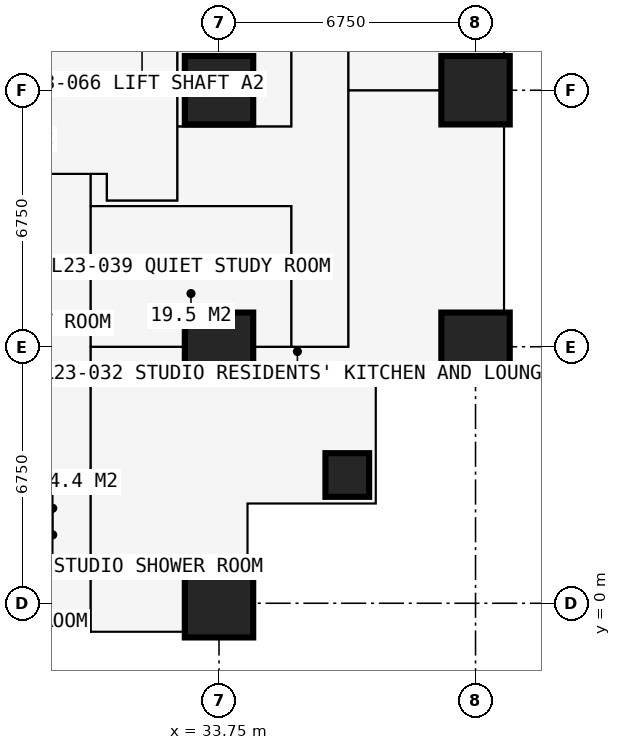
"""IFC4 building model, lengths in metres.
Left out: names, types, materials, properties, quantities, classifications, styles, units other than length and angle.
Written with IfcOpenShell. Run it as: python <this file> out.ifc"""

import sys

from ifc_helpers import new_model, si_unit, direction, frame, frame_2d, origin, origin_2d, place, context, subcontext, project, spatial, rectangle, extrude, element, fill, save


model = new_model("IFC4")
c1 = context("Model", 3, precision=1e-05, world=origin(), true_north=direction((0.0, 1.0)))
c2 = subcontext(c1, "Body", "Model", "MODEL_VIEW")
j1 = project(units=[si_unit("LENGTHUNIT", "METRE"), si_unit("PLANEANGLEUNIT", "RADIAN")], contexts=[c1])
p1 = place(None, origin())
s1 = spatial("IfcSite", under=j1, at=p1, CompositionType="ELEMENT")
p2 = place(p1, origin())
s2 = spatial("IfcBuilding", under=s1, at=p2, CompositionType="ELEMENT")
p3 = place(p2, frame((0.0, 0.0, 87.3)))
s3 = spatial("IfcBuildingStorey", under=s2, at=p3, CompositionType="ELEMENT", Elevation=87.3)
for number, where, z_axis, x_axis in (
    (1, (33.75, 0.0, 0.0), (0.0, 0.0, 1.0), (1.0, 0.0, 0.0)),
    (2, (33.75, 6.75, 0.0), (0.0, 0.0, 1.0), (1.0, 0.0, 0.0)),
    (3, (33.75, 13.5, 0.0), (0.0, 0.0, 1.0), (1.0, 0.0, 0.0)),
):
    element("IfcColumn", number, at=place(p3, frame(where, z_axis=z_axis, x_axis=x_axis)), inside=s3, PredefinedType="COLUMN", context=c2, shape_type="SweptSolid", body=[
        extrude(rectangle(XDim=1.8, YDim=1.8, at=origin_2d()), origin(), (0.0, 0.0, 1.0), 3.6),
    ])
p4 = place(p3, frame((37.125, 3.375, 0.0), z_axis=(0.0, 0.0, 1.0), x_axis=(1.0, 0.0, 0.0)))
e4 = element("IfcColumn", 4, at=p4, inside=s3, PredefinedType="COLUMN", context=c2, shape_type="SweptSolid", body=[
    extrude(rectangle(XDim=1.15, YDim=1.15, at=origin_2d()), origin(), (0.0, 0.0, 1.0), 3.6),
])
for number, where, z_axis, x_axis in (
    (5, (40.5, 6.75, 0.0), (0.0, 0.0, 1.0), (1.0, 0.0, 0.0)),
    (6, (40.5, 13.5, 0.0), (0.0, 0.0, 1.0), (1.0, 0.0, 0.0)),
):
    element("IfcColumn", number, at=place(p3, frame(where, z_axis=z_axis, x_axis=x_axis)), inside=s3, PredefinedType="COLUMN", context=c2, shape_type="SweptSolid", body=[
        extrude(rectangle(XDim=1.8, YDim=1.8, at=origin_2d()), origin(), (0.0, 0.0, 1.0), 3.6),
    ])
p5 = place(p3, frame((41.25, 20.25, 0.0), z_axis=(0.0, 0.0, 1.0), x_axis=(0.0, -1.0, 0.0)))
e7 = element("IfcWall", 7, at=p5, inside=s3, PredefinedType="SOLIDWALL", context=c2, shape_type="SweptSolid", body=[
    extrude(rectangle(XDim=6.75, YDim=0.15, at=frame_2d((3.375, 0.0))), origin(), (0.0, 0.0, 1.0), 3.375),
])
p6 = place(p5, frame((0.962, 0.0, 0.0)))
e8 = element("IfcOpeningElement", 8, at=p6, cuts=e7, PredefinedType="OPENING", context=c2, shape_type="SweptSolid", body=[
    extrude(rectangle(XDim=1.0, YDim=2.2, at=frame_2d((0.5, 1.1))), frame((0.0, 0.085, 0.0), z_axis=(0.0, -1.0, 0.0), x_axis=(1.0, 0.0, 0.0)), (0.0, 0.0, 1.0), 0.17),
])
p7 = place(p5, frame((2.025, 0.0, 0.9)))
e9 = element("IfcOpeningElement", 9, at=p7, cuts=e7, PredefinedType="OPENING", context=c2, shape_type="SweptSolid", body=[
    extrude(rectangle(XDim=1.2, YDim=1.8, at=frame_2d((0.6, 0.9))), frame((0.0, 0.085, 0.0), z_axis=(0.0, -1.0, 0.0), x_axis=(1.0, 0.0, 0.0)), (0.0, 0.0, 1.0), 0.17),
])
p8 = place(p5, frame((4.788, 0.0, 0.0)))
e10 = element("IfcOpeningElement", 10, at=p8, cuts=e7, PredefinedType="OPENING", context=c2, shape_type="SweptSolid", body=[
    extrude(rectangle(XDim=1.0, YDim=2.2, at=frame_2d((0.5, 1.1))), frame((0.0, 0.085, 0.0), z_axis=(0.0, -1.0, 0.0), x_axis=(1.0, 0.0, 0.0)), (0.0, 0.0, 1.0), 0.17),
])
p9 = place(p5, frame((3.525, 0.0, 0.9)))
e11 = element("IfcOpeningElement", 11, at=p9, cuts=e7, PredefinedType="OPENING", context=c2, shape_type="SweptSolid", body=[
    extrude(rectangle(XDim=1.2, YDim=1.8, at=frame_2d((0.6, 0.9))), frame((0.0, 0.085, 0.0), z_axis=(0.0, -1.0, 0.0), x_axis=(1.0, 0.0, 0.0)), (0.0, 0.0, 1.0), 0.17),
])
p10 = place(p3, frame((34.5, -0.75, 0.0), z_axis=(0.0, 0.0, 1.0), x_axis=(0.0, 1.0, 0.0)))
e12 = element("IfcWall", 12, at=p10, inside=s3, PredefinedType="SOLIDWALL", context=c2, shape_type="SweptSolid", body=[
    extrude(rectangle(XDim=3.375, YDim=0.3, at=frame_2d((1.688, 0.0))), origin(), (0.0, 0.0, 1.0), 3.375),
])
p11 = place(p10, frame((1.833, 0.0, 0.9)))
e13 = element("IfcOpeningElement", 13, at=p11, cuts=e12, PredefinedType="OPENING", context=c2, shape_type="SweptSolid", body=[
    extrude(rectangle(XDim=1.2, YDim=1.8, at=frame_2d((0.6, 0.9))), frame((0.0, 0.16, 0.0), z_axis=(0.0, -1.0, 0.0), x_axis=(1.0, 0.0, 0.0)), (0.0, 0.0, 1.0), 0.32),
])
p12 = place(p3, frame((34.5, 2.625, 0.0), z_axis=(0.0, 0.0, 1.0), x_axis=(1.0, 0.0, 0.0)))
e14 = element("IfcWall", 14, at=p12, inside=s3, PredefinedType="SOLIDWALL", context=c2, shape_type="SweptSolid", body=[
    extrude(rectangle(XDim=3.375, YDim=0.3, at=frame_2d((1.688, 0.0))), origin(), (0.0, 0.0, 1.0), 3.375),
])
p13 = place(p12, frame((0.788, 0.0, 0.6)))
e15 = element("IfcOpeningElement", 15, at=p13, cuts=e14, PredefinedType="OPENING", context=c2, shape_type="SweptSolid", body=[
    extrude(rectangle(XDim=1.8, YDim=2.1, at=frame_2d((0.9, 1.05))), frame((0.0, 0.16, 0.0), z_axis=(0.0, -1.0, 0.0), x_axis=(1.0, 0.0, 0.0)), (0.0, 0.0, 1.0), 0.32),
])
p14 = place(p3, frame((37.875, 2.625, 0.0), z_axis=(0.0, 0.0, 1.0), x_axis=(0.0, 1.0, 0.0)))
e16 = element("IfcWall", 16, at=p14, inside=s3, PredefinedType="SOLIDWALL", context=c2, shape_type="SweptSolid", body=[
    extrude(rectangle(XDim=3.375, YDim=0.3, at=frame_2d((1.688, 0.0))), origin(), (0.0, 0.0, 1.0), 3.375),
])
p15 = place(p14, frame((0.788, 0.0, 0.6)))
e17 = element("IfcOpeningElement", 17, at=p15, cuts=e16, PredefinedType="OPENING", context=c2, shape_type="SweptSolid", body=[
    extrude(rectangle(XDim=1.8, YDim=2.1, at=frame_2d((0.9, 1.05))), frame((0.0, 0.16, 0.0), z_axis=(0.0, -1.0, 0.0), x_axis=(1.0, 0.0, 0.0)), (0.0, 0.0, 1.0), 0.32),
])
p16 = place(p3, frame((37.875, 6.0, 0.0), z_axis=(0.0, 0.0, 1.0), x_axis=(1.0, 0.0, 0.0)))
e18 = element("IfcWall", 18, at=p16, inside=s3, PredefinedType="SOLIDWALL", context=c2, shape_type="SweptSolid", body=[
    extrude(rectangle(XDim=3.375, YDim=0.3, at=frame_2d((1.688, 0.0))), origin(), (0.0, 0.0, 1.0), 3.375),
])
p17 = place(p16, frame((0.343, 0.0, 0.9)))
e19 = element("IfcOpeningElement", 19, at=p17, cuts=e18, PredefinedType="OPENING", context=c2, shape_type="SweptSolid", body=[
    extrude(rectangle(XDim=1.2, YDim=1.8, at=frame_2d((0.6, 0.9))), frame((0.0, 0.16, 0.0), z_axis=(0.0, -1.0, 0.0), x_axis=(1.0, 0.0, 0.0)), (0.0, 0.0, 1.0), 0.32),
])
p18 = place(p3, frame((6.75, 3.35, 0.0), z_axis=(0.0, 0.0, 1.0), x_axis=(1.0, 0.0, 0.0)))
e20 = element("IfcWall", 20, at=p18, inside=s3, PredefinedType="PARTITIONING", context=c2, shape_type="SweptSolid", body=[
    extrude(rectangle(XDim=23.625, YDim=0.1, at=frame_2d((11.812, 0.0))), origin(), (0.0, 0.0, 1.0), 3.375),
])
p19 = place(p18, frame((1.2, 0.0, 0.0)))
e21 = element("IfcOpeningElement", 21, at=p19, cuts=e20, PredefinedType="OPENING", context=c2, shape_type="SweptSolid", body=[
    extrude(rectangle(XDim=1.0, YDim=2.2, at=frame_2d((0.5, 1.1))), frame((0.0, 0.06, 0.0), z_axis=(0.0, -1.0, 0.0), x_axis=(1.0, 0.0, 0.0)), (0.0, 0.0, 1.0), 0.12),
])
p20 = place(p18, frame((3.575, 0.0, 0.0)))
e22 = element("IfcOpeningElement", 22, at=p20, cuts=e20, PredefinedType="OPENING", context=c2, shape_type="SweptSolid", body=[
    extrude(rectangle(XDim=0.95, YDim=2.2, at=frame_2d((0.475, 1.1))), frame((0.0, 0.06, 0.0), z_axis=(0.0, -1.0, 0.0), x_axis=(1.0, 0.0, 0.0)), (0.0, 0.0, 1.0), 0.12),
])
p21 = place(p18, frame((6.95, 0.0, 0.0)))
e23 = element("IfcOpeningElement", 23, at=p21, cuts=e20, PredefinedType="OPENING", context=c2, shape_type="SweptSolid", body=[
    extrude(rectangle(XDim=0.95, YDim=2.2, at=frame_2d((0.475, 1.1))), frame((0.0, 0.06, 0.0), z_axis=(0.0, -1.0, 0.0), x_axis=(1.0, 0.0, 0.0)), (0.0, 0.0, 1.0), 0.12),
])
p22 = place(p18, frame((10.325, 0.0, 0.0)))
e24 = element("IfcOpeningElement", 24, at=p22, cuts=e20, PredefinedType="OPENING", context=c2, shape_type="SweptSolid", body=[
    extrude(rectangle(XDim=0.95, YDim=2.2, at=frame_2d((0.475, 1.1))), frame((0.0, 0.06, 0.0), z_axis=(0.0, -1.0, 0.0), x_axis=(1.0, 0.0, 0.0)), (0.0, 0.0, 1.0), 0.12),
])
p23 = place(p18, frame((15.1, 0.0, 0.0)))
e25 = element("IfcOpeningElement", 25, at=p23, cuts=e20, PredefinedType="OPENING", context=c2, shape_type="SweptSolid", body=[
    extrude(rectangle(XDim=0.95, YDim=2.2, at=frame_2d((0.475, 1.1))), frame((0.0, 0.06, 0.0), z_axis=(0.0, -1.0, 0.0), x_axis=(1.0, 0.0, 0.0)), (0.0, 0.0, 1.0), 0.12),
])
p24 = place(p18, frame((20.45, 0.0, 0.0)))
e26 = element("IfcOpeningElement", 26, at=p24, cuts=e20, PredefinedType="OPENING", context=c2, shape_type="SweptSolid", body=[
    extrude(rectangle(XDim=0.95, YDim=2.2, at=frame_2d((0.475, 1.1))), frame((0.0, 0.06, 0.0), z_axis=(0.0, -1.0, 0.0), x_axis=(1.0, 0.0, 0.0)), (0.0, 0.0, 1.0), 0.12),
])
p25 = place(p3, frame((10.125, 11.3, 0.0), z_axis=(0.0, 0.0, 1.0), x_axis=(1.0, 0.0, 0.0)))
e27 = element("IfcWall", 27, at=p25, inside=s3, PredefinedType="PARTITIONING", context=c2, shape_type="SweptSolid", body=[
    extrude(rectangle(XDim=20.675, YDim=0.15, at=frame_2d((10.337, 0.0))), origin(), (0.0, 0.0, 1.0), 3.375),
])
p26 = place(p25, frame((8.375, 0.0, 0.0)))
e28 = element("IfcOpeningElement", 28, at=p26, cuts=e27, PredefinedType="OPENING", context=c2, shape_type="SweptSolid", body=[
    extrude(rectangle(XDim=1.0, YDim=2.2, at=frame_2d((0.5, 1.1))), frame((0.0, 0.085, 0.0), z_axis=(0.0, -1.0, 0.0), x_axis=(1.0, 0.0, 0.0)), (0.0, 0.0, 1.0), 0.17),
])
p27 = place(p25, frame((10.975, 0.0, 0.0)))
e29 = element("IfcOpeningElement", 29, at=p27, cuts=e27, PredefinedType="OPENING", context=c2, shape_type="SweptSolid", body=[
    extrude(rectangle(XDim=1.0, YDim=2.2, at=frame_2d((0.5, 1.1))), frame((0.0, 0.085, 0.0), z_axis=(0.0, -1.0, 0.0), x_axis=(1.0, 0.0, 0.0)), (0.0, 0.0, 1.0), 0.17),
])
p28 = place(p25, frame((3.925, 0.0, 0.0)))
e30 = element("IfcOpeningElement", 30, at=p28, cuts=e27, PredefinedType="OPENING", context=c2, shape_type="SweptSolid", body=[
    extrude(rectangle(XDim=0.95, YDim=2.2, at=frame_2d((0.475, 1.1))), frame((0.0, 0.085, 0.0), z_axis=(0.0, -1.0, 0.0), x_axis=(1.0, 0.0, 0.0)), (0.0, 0.0, 1.0), 0.17),
])
p29 = place(p3, frame((27.725, 5.95, 0.0), z_axis=(0.0, 0.0, 1.0), x_axis=(1.0, 0.0, 0.0)))
e31 = element("IfcWall", 31, at=p29, inside=s3, PredefinedType="PARTITIONING", context=c2, shape_type="SweptSolid", body=[
    extrude(rectangle(XDim=2.65, YDim=0.15, at=frame_2d((1.325, 0.0))), origin(), (0.0, 0.0, 1.0), 3.375),
])
p30 = place(p3, frame((28.375, 1.15, 0.0), z_axis=(0.0, 0.0, 1.0), x_axis=(1.0, 0.0, 0.0)))
e32 = element("IfcWall", 32, at=p30, inside=s3, PredefinedType="PARTITIONING", context=c2, shape_type="SweptSolid", body=[
    extrude(rectangle(XDim=2.0, YDim=0.1, at=frame_2d((1.0, 0.0))), origin(), (0.0, 0.0, 1.0), 3.375),
])
p31 = place(p3, frame((30.375, -0.734, 0.0), z_axis=(0.0, 0.0, 1.0), x_axis=(0.0, 1.0, 0.0)))
e33 = element("IfcWall", 33, at=p31, inside=s3, PredefinedType="PARTITIONING", context=c2, shape_type="SweptSolid", body=[
    extrude(rectangle(XDim=12.034, YDim=0.15, at=frame_2d((6.017, 0.0))), origin(), (0.0, 0.0, 1.0), 3.375),
])
p32 = place(p31, frame((4.884, 0.0, 0.0)))
e34 = element("IfcOpeningElement", 34, at=p32, cuts=e33, PredefinedType="OPENING", context=c2, shape_type="SweptSolid", body=[
    extrude(rectangle(XDim=1.0, YDim=2.2, at=frame_2d((0.5, 1.1))), frame((0.0, 0.085, 0.0), z_axis=(0.0, -1.0, 0.0), x_axis=(1.0, 0.0, 0.0)), (0.0, 0.0, 1.0), 0.17),
])
p33 = place(p3, frame((30.375, 6.75, 0.0), z_axis=(0.0, 0.0, 1.0), x_axis=(1.0, 0.0, 0.0)))
e35 = element("IfcWall", 35, at=p33, inside=s3, PredefinedType="PARTITIONING", context=c2, shape_type="SweptSolid", body=[
    extrude(rectangle(XDim=6.775, YDim=0.15, at=frame_2d((3.387, 0.0))), origin(), (0.0, 0.0, 1.0), 2.877),
])
p34 = place(p3, frame((30.375, 10.45, 0.0), z_axis=(0.0, 0.0, 1.0), x_axis=(1.0, 0.0, 0.0)))
e36 = element("IfcWall", 36, at=p34, inside=s3, PredefinedType="PARTITIONING", context=c2, shape_type="SweptSolid", body=[
    extrude(rectangle(XDim=5.275, YDim=0.15, at=frame_2d((2.637, 0.0))), origin(), (0.0, 0.0, 1.0), 3.375),
])
p35 = place(p34, frame((2.35, 0.0, 0.0)))
e37 = element("IfcOpeningElement", 37, at=p35, cuts=e36, PredefinedType="OPENING", context=c2, shape_type="SweptSolid", body=[
    extrude(rectangle(XDim=0.95, YDim=2.2, at=frame_2d((0.475, 1.1))), frame((0.0, 0.085, 0.0), z_axis=(0.0, -1.0, 0.0), x_axis=(1.0, 0.0, 0.0)), (0.0, 0.0, 1.0), 0.17),
])
p36 = place(p3, frame((30.8, 10.6, 0.0), z_axis=(0.0, 0.0, 1.0), x_axis=(0.0, 1.0, 0.0)))
e38 = element("IfcWall", 38, at=p36, inside=s3, PredefinedType="PARTITIONING", context=c2, shape_type="SweptSolid", body=[
    extrude(rectangle(XDim=0.7, YDim=0.15, at=frame_2d((0.35, 0.0))), origin(), (0.0, 0.0, 1.0), 3.375),
])
p37 = place(p3, frame((30.8, 10.6, 0.0), z_axis=(0.0, 0.0, 1.0), x_axis=(1.0, 0.0, 0.0)))
e39 = element("IfcWall", 39, at=p37, inside=s3, PredefinedType="PARTITIONING", context=c2, shape_type="SweptSolid", body=[
    extrude(rectangle(XDim=1.85, YDim=0.15, at=frame_2d((0.925, 0.0))), origin(), (0.0, 0.0, 1.0), 3.375),
])
p38 = place(p3, frame((32.65, 10.6, 0.0), z_axis=(0.0, 0.0, 1.0), x_axis=(0.0, 1.0, 0.0)))
e40 = element("IfcWall", 40, at=p38, inside=s3, PredefinedType="SHEAR", context=c2, shape_type="SweptSolid", body=[
    extrude(rectangle(XDim=9.3, YDim=0.1, at=frame_2d((4.65, 0.0))), origin(), (0.0, 0.0, 1.0), 3.375),
])
p39 = place(p38, frame((0.5, 0.0, 0.0)))
e41 = element("IfcOpeningElement", 41, at=p39, cuts=e40, PredefinedType="OPENING", context=c2, shape_type="SweptSolid", body=[
    extrude(rectangle(XDim=1.0, YDim=2.2, at=frame_2d((0.5, 1.1))), frame((0.0, 0.06, 0.0), z_axis=(0.0, -1.0, 0.0), x_axis=(1.0, 0.0, 0.0)), (0.0, 0.0, 1.0), 0.12),
])
p40 = place(p3, frame((32.65, 12.55, 0.0), z_axis=(0.0, 0.0, 1.0), x_axis=(1.0, 0.0, 0.0)))
e42 = element("IfcWall", 42, at=p40, inside=s3, PredefinedType="PARTITIONING", context=c2, shape_type="SweptSolid", body=[
    extrude(rectangle(XDim=3.0, YDim=0.15, at=frame_2d((1.5, 0.0))), origin(), (0.0, 0.0, 1.0), 3.375),
])
p41 = place(p3, frame((35.65, 6.75, 0.0), z_axis=(0.0, 0.0, 1.0), x_axis=(0.0, 1.0, 0.0)))
e43 = element("IfcWall", 43, at=p41, inside=s3, PredefinedType="PARTITIONING", context=c2, shape_type="SweptSolid", body=[
    extrude(rectangle(XDim=3.7, YDim=0.15, at=frame_2d((1.85, 0.0))), origin(), (0.0, 0.0, 1.0), 3.375),
])
p42 = place(p3, frame((35.65, 12.55, 0.0), z_axis=(0.0, 0.0, 1.0), x_axis=(0.0, 1.0, 0.0)))
e44 = element("IfcWall", 44, at=p42, inside=s3, PredefinedType="PARTITIONING", context=c2, shape_type="SweptSolid", body=[
    extrude(rectangle(XDim=15.175, YDim=0.15, at=frame_2d((7.587, 0.0))), origin(), (0.0, 0.0, 1.0), 3.375),
])
p43 = place(p42, frame((5.8, 0.0, 0.0)))
e45 = element("IfcOpeningElement", 45, at=p43, cuts=e44, PredefinedType="OPENING", context=c2, shape_type="SweptSolid", body=[
    extrude(rectangle(XDim=0.95, YDim=2.2, at=frame_2d((0.475, 1.1))), frame((0.0, 0.085, 0.0), z_axis=(0.0, -1.0, 0.0), x_axis=(1.0, 0.0, 0.0)), (0.0, 0.0, 1.0), 0.17),
])
p44 = place(p3, frame((37.15, 6.75, 0.0), z_axis=(0.0, 0.0, 1.0), x_axis=(0.0, 1.0, 0.0)))
e46 = element("IfcWall", 46, at=p44, inside=s3, PredefinedType="PARTITIONING", context=c2, shape_type="SweptSolid", body=[
    extrude(rectangle(XDim=20.25, YDim=0.15, at=frame_2d((10.125, 0.0))), origin(), (0.0, 0.0, 1.0), 3.375),
])
p45 = place(p44, frame((15.1, 0.0, 0.0)))
e47 = element("IfcOpeningElement", 47, at=p45, cuts=e46, PredefinedType="OPENING", context=c2, shape_type="SweptSolid", body=[
    extrude(rectangle(XDim=0.95, YDim=2.2, at=frame_2d((0.475, 1.1))), frame((0.0, 0.085, 0.0), z_axis=(0.0, -1.0, 0.0), x_axis=(1.0, 0.0, 0.0)), (0.0, 0.0, 1.0), 0.17),
])
p46 = place(p44, frame((8.35, 0.0, 0.0)))
e48 = element("IfcOpeningElement", 48, at=p46, cuts=e46, PredefinedType="OPENING", context=c2, shape_type="SweptSolid", body=[
    extrude(rectangle(XDim=0.95, YDim=2.2, at=frame_2d((0.475, 1.1))), frame((0.0, 0.085, 0.0), z_axis=(0.0, -1.0, 0.0), x_axis=(1.0, 0.0, 0.0)), (0.0, 0.0, 1.0), 0.17),
])
p47 = place(p3, frame((37.15, 13.5, 0.0), z_axis=(0.0, 0.0, 1.0), x_axis=(1.0, 0.0, 0.0)))
e49 = element("IfcWall", 49, at=p47, inside=s3, PredefinedType="PARTITIONING", context=c2, shape_type="SweptSolid", body=[
    extrude(rectangle(XDim=4.084, YDim=0.15, at=frame_2d((2.042, 0.0))), origin(), (0.0, 0.0, 1.0), 2.877),
])
p48 = place(p8, origin())
e50 = element("IfcDoor", 50, at=p48, inside=s3, OperationType="SINGLE_SWING_RIGHT", PredefinedType="DOOR", context=c2, shape_type="SweptSolid", body=[
    extrude(rectangle(XDim=1.0, YDim=2.2, at=frame_2d((0.5, 1.1))), frame((0.0, 0.025, 0.0), z_axis=(0.0, -1.0, 0.0), x_axis=(1.0, 0.0, 0.0)), (0.0, 0.0, 1.0), 0.05),
])
fill(e10, e50)
p49 = place(p11, origin())
e51 = element("IfcWindow", 51, at=p49, inside=s3, PartitioningType="SINGLE_PANEL", PredefinedType="WINDOW", context=c2, shape_type="SweptSolid", body=[
    extrude(rectangle(XDim=1.2, YDim=1.8, at=frame_2d((0.6, 0.9))), frame((0.0, 0.03, 0.0), z_axis=(0.0, -1.0, 0.0), x_axis=(1.0, 0.0, 0.0)), (0.0, 0.0, 1.0), 0.06),
])
fill(e13, e51)
p50 = place(p13, origin())
e52 = element("IfcWindow", 52, at=p50, inside=s3, PartitioningType="SINGLE_PANEL", PredefinedType="WINDOW", context=c2, shape_type="SweptSolid", body=[
    extrude(rectangle(XDim=1.8, YDim=2.1, at=frame_2d((0.9, 1.05))), frame((0.0, 0.03, 0.0), z_axis=(0.0, -1.0, 0.0), x_axis=(1.0, 0.0, 0.0)), (0.0, 0.0, 1.0), 0.06),
])
fill(e15, e52)
p51 = place(p15, origin())
e53 = element("IfcWindow", 53, at=p51, inside=s3, PartitioningType="SINGLE_PANEL", PredefinedType="WINDOW", context=c2, shape_type="SweptSolid", body=[
    extrude(rectangle(XDim=1.8, YDim=2.1, at=frame_2d((0.9, 1.05))), frame((0.0, 0.03, 0.0), z_axis=(0.0, -1.0, 0.0), x_axis=(1.0, 0.0, 0.0)), (0.0, 0.0, 1.0), 0.06),
])
fill(e17, e53)
p52 = place(p17, origin())
e54 = element("IfcWindow", 54, at=p52, inside=s3, PartitioningType="SINGLE_PANEL", PredefinedType="WINDOW", context=c2, shape_type="SweptSolid", body=[
    extrude(rectangle(XDim=1.2, YDim=1.8, at=frame_2d((0.6, 0.9))), frame((0.0, 0.03, 0.0), z_axis=(0.0, -1.0, 0.0), x_axis=(1.0, 0.0, 0.0)), (0.0, 0.0, 1.0), 0.06),
])
fill(e19, e54)
p53 = place(p32, origin())
e55 = element("IfcDoor", 55, at=p53, inside=s3, OperationType="SINGLE_SWING_LEFT", PredefinedType="DOOR", context=c2, shape_type="SweptSolid", body=[
    extrude(rectangle(XDim=1.0, YDim=2.2, at=frame_2d((0.5, 1.1))), frame((0.0, 0.025, 0.0), z_axis=(0.0, -1.0, 0.0), x_axis=(1.0, 0.0, 0.0)), (0.0, 0.0, 1.0), 0.05),
])
fill(e34, e55)
p54 = place(p39, origin())
e56 = element("IfcDoor", 56, at=p54, inside=s3, OperationType="SINGLE_SWING_LEFT", PredefinedType="DOOR", context=c2, shape_type="SweptSolid", body=[
    extrude(rectangle(XDim=1.0, YDim=2.2, at=frame_2d((0.5, 1.1))), frame((0.0, 0.025, 0.0), z_axis=(0.0, -1.0, 0.0), x_axis=(1.0, 0.0, 0.0)), (0.0, 0.0, 1.0), 0.05),
])
fill(e41, e56)
p55 = place(p35, origin())
e57 = element("IfcDoor", 57, at=p55, inside=s3, OperationType="SINGLE_SWING_LEFT", PredefinedType="DOOR", context=c2, shape_type="SweptSolid", body=[
    extrude(rectangle(XDim=0.95, YDim=2.2, at=frame_2d((0.475, 1.1))), frame((0.0, 0.025, 0.0), z_axis=(0.0, -1.0, 0.0), x_axis=(1.0, 0.0, 0.0)), (0.0, 0.0, 1.0), 0.05),
])
fill(e37, e57)
save(model, sys.argv[1])
